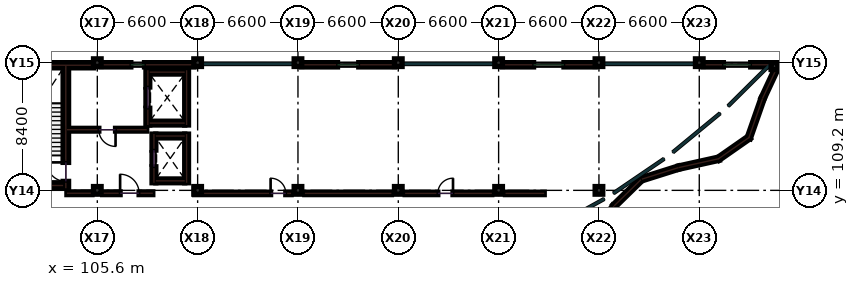
"""IFC4 building model, lengths in metres.
Left out: names, types, materials, properties, quantities, classifications, styles, units other than length and angle.
Written with IfcOpenShell. Run it as: python <this file> out.ifc"""

import sys

from ifc_helpers import new_model, si_unit, direction, frame, frame_2d, origin, origin_2d, place, context, subcontext, project, spatial, rectangle, extrude, element, fill, save


model = new_model("IFC4")
c1 = context("Model", 3, precision=1e-05, world=origin(), true_north=direction((0.0, 1.0)))
c2 = subcontext(c1, "Body", "Model", "MODEL_VIEW")
j1 = project(units=[si_unit("LENGTHUNIT", "METRE"), si_unit("PLANEANGLEUNIT", "RADIAN")], contexts=[c1])
p1 = place(None, origin())
s1 = spatial("IfcSite", under=j1, at=p1, CompositionType="ELEMENT")
p2 = place(p1, origin())
s2 = spatial("IfcBuilding", under=s1, at=p2, CompositionType="ELEMENT")
p3 = place(p2, frame((0.0, 0.0, 18.6)))
s3 = spatial("IfcBuildingStorey", under=s2, at=p3, CompositionType="ELEMENT", Elevation=18.6)
for number, where, z_axis, x_axis in (
    (1, (105.6, 109.2, 0.0), (0.0, 0.0, 1.0), (1.0, 0.0, 0.0)),
    (2, (105.6, 117.6, 0.0), (0.0, 0.0, 1.0), (1.0, 0.0, 0.0)),
    (3, (112.2, 109.2, 0.0), (0.0, 0.0, 1.0), (1.0, 0.0, 0.0)),
    (4, (112.2, 117.6, 0.0), (0.0, 0.0, 1.0), (1.0, 0.0, 0.0)),
    (5, (118.8, 109.2, 0.0), (0.0, 0.0, 1.0), (1.0, 0.0, 0.0)),
    (6, (118.8, 117.6, 0.0), (0.0, 0.0, 1.0), (1.0, 0.0, 0.0)),
    (7, (125.4, 109.2, 0.0), (0.0, 0.0, 1.0), (1.0, 0.0, 0.0)),
    (8, (125.4, 117.6, 0.0), (0.0, 0.0, 1.0), (1.0, 0.0, 0.0)),
    (9, (132.0, 109.2, 0.0), (0.0, 0.0, 1.0), (1.0, 0.0, 0.0)),
    (10, (132.0, 117.6, 0.0), (0.0, 0.0, 1.0), (1.0, 0.0, 0.0)),
    (11, (138.6, 109.2, 0.0), (0.0, 0.0, 1.0), (1.0, 0.0, 0.0)),
    (12, (138.6, 117.6, 0.0), (0.0, 0.0, 1.0), (1.0, 0.0, 0.0)),
    (13, (145.2, 117.6, 0.0), (0.0, 0.0, 1.0), (1.0, 0.0, 0.0)),
):
    element("IfcColumn", number, at=place(p3, frame(where, z_axis=z_axis, x_axis=x_axis)), inside=s3, PredefinedType="COLUMN", context=c2, shape_type="SweptSolid", body=[
        extrude(rectangle(XDim=0.5, YDim=0.5, at=origin_2d()), origin(), (0.0, 0.0, 1.0), 4.2),
    ])
p4 = place(p3, frame((150.15, 117.375, 0.0), z_axis=(0.0, 0.0, 1.0), x_axis=(1.0, 0.0, 0.0)))
e14 = element("IfcColumn", 14, at=p4, inside=s3, PredefinedType="COLUMN", context=c2, shape_type="SweptSolid", body=[
    extrude(rectangle(XDim=0.45, YDim=0.45, at=origin_2d()), origin(), (0.0, 0.0, 1.0), 4.2),
])
p5 = place(p3, frame((112.0, 109.0, 0.0), z_axis=(0.0, 0.0, 1.0), x_axis=(1.0, 0.0, 0.0)))
e15 = element("IfcWall", 15, at=p5, inside=s3, PredefinedType="PARTITIONING", context=c2, shape_type="SweptSolid", body=[
    extrude(rectangle(XDim=6.35, YDim=0.16, at=frame_2d((3.175, 0.0))), origin(), (0.0, 0.0, 1.0), 3.175),
])
p6 = place(p5, frame((5.0, 0.0, 0.0)))
e16 = element("IfcOpeningElement", 16, at=p6, cuts=e15, PredefinedType="OPENING", context=c2, shape_type="SweptSolid", body=[
    extrude(rectangle(XDim=1.0, YDim=2.2, at=frame_2d((0.5, 1.1))), frame((0.0, 0.09, 0.0), z_axis=(0.0, -1.0, 0.0), x_axis=(1.0, 0.0, 0.0)), (0.0, 0.0, 1.0), 0.18),
])
p7 = place(p3, frame((119.25, 109.0, 0.0), z_axis=(0.0, 0.0, 1.0), x_axis=(1.0, 0.0, 0.0)))
e17 = element("IfcWall", 17, at=p7, inside=s3, PredefinedType="PARTITIONING", context=c2, shape_type="SweptSolid", body=[
    extrude(rectangle(XDim=5.7, YDim=0.16, at=frame_2d((2.85, 0.0))), origin(), (0.0, 0.0, 1.0), 3.175),
])
p8 = place(p3, frame((125.85, 109.0, 0.0), z_axis=(0.0, 0.0, 1.0), x_axis=(1.0, 0.0, 0.0)))
e18 = element("IfcWall", 18, at=p8, inside=s3, PredefinedType="PARTITIONING", context=c2, shape_type="SweptSolid", body=[
    extrude(rectangle(XDim=5.7, YDim=0.16, at=frame_2d((2.85, 0.0))), origin(), (0.0, 0.0, 1.0), 3.175),
])
p9 = place(p8, frame((2.15, 0.0, 0.0)))
e19 = element("IfcOpeningElement", 19, at=p9, cuts=e18, PredefinedType="OPENING", context=c2, shape_type="SweptSolid", body=[
    extrude(rectangle(XDim=1.0, YDim=2.2, at=frame_2d((0.5, 1.1))), frame((0.0, 0.09, 0.0), z_axis=(0.0, -1.0, 0.0), x_axis=(1.0, 0.0, 0.0)), (0.0, 0.0, 1.0), 0.18),
])
p10 = place(p3, frame((132.45, 109.0, 0.0), z_axis=(0.0, 0.0, 1.0), x_axis=(1.0, 0.0, 0.0)))
e20 = element("IfcWall", 20, at=p10, inside=s3, PredefinedType="PARTITIONING", context=c2, shape_type="SweptSolid", body=[
    extrude(rectangle(XDim=2.55, YDim=0.16, at=frame_2d((1.275, 0.0))), origin(), (0.0, 0.0, 1.0), 3.175),
])
p11 = place(p3, frame((105.355, 117.43, 0.0), z_axis=(0.0, 0.0, 1.0), x_axis=(-1.0, 0.0, 0.0)))
e21 = element("IfcWall", 21, at=p11, inside=s3, PredefinedType="SHEAR", context=c2, shape_type="SweptSolid", body=[
    extrude(rectangle(XDim=6.11, YDim=0.34, at=frame_2d((3.055, 0.0))), origin(), (0.0, 0.0, 1.0), 3.94),
])
p12 = place(p3, frame((111.955, 117.46, 0.0), z_axis=(0.0, 0.0, 1.0), x_axis=(-1.0, 0.0, 0.0)))
e22 = element("IfcWall", 22, at=p12, inside=s3, PredefinedType="SOLIDWALL", context=c2, shape_type="SweptSolid", body=[
    extrude(rectangle(XDim=6.11, YDim=0.28, at=frame_2d((3.055, 0.0))), origin(), (0.0, 0.0, 1.0), 3.325),
])
p13 = place(p12, frame((3.25, 0.0, 0.95)))
e23 = element("IfcOpeningElement", 23, at=p13, cuts=e22, PredefinedType="OPENING", context=c2, shape_type="SweptSolid", body=[
    extrude(rectangle(XDim=0.9, YDim=1.4, at=frame_2d((0.45, 0.7))), frame((0.0, 0.15, 0.0), z_axis=(0.0, -1.0, 0.0), x_axis=(1.0, 0.0, 0.0)), (0.0, 0.0, 1.0), 0.3),
])
p14 = place(p3, frame((125.155, 117.46, 0.0), z_axis=(0.0, 0.0, 1.0), x_axis=(-1.0, 0.0, 0.0)))
e24 = element("IfcWall", 24, at=p14, inside=s3, PredefinedType="SOLIDWALL", context=c2, shape_type="SweptSolid", body=[
    extrude(rectangle(XDim=6.11, YDim=0.28, at=frame_2d((3.055, 0.0))), origin(), (0.0, 0.0, 1.0), 3.325),
])
p15 = place(p14, frame((2.355, 0.0, 0.95)))
e25 = element("IfcOpeningElement", 25, at=p15, cuts=e24, PredefinedType="OPENING", context=c2, shape_type="SweptSolid", body=[
    extrude(rectangle(XDim=1.4, YDim=1.95, at=frame_2d((0.7, 0.975))), frame((0.0, 0.15, 0.0), z_axis=(0.0, -1.0, 0.0), x_axis=(1.0, 0.0, 0.0)), (0.0, 0.0, 1.0), 0.3),
])
p16 = place(p3, frame((138.355, 117.46, 0.0), z_axis=(0.0, 0.0, 1.0), x_axis=(-1.0, 0.0, 0.0)))
e26 = element("IfcWall", 26, at=p16, inside=s3, PredefinedType="SOLIDWALL", context=c2, shape_type="SweptSolid", body=[
    extrude(rectangle(XDim=6.11, YDim=0.28, at=frame_2d((3.055, 0.0))), origin(), (0.0, 0.0, 1.0), 3.325),
])
p17 = place(p16, frame((2.055, 0.0, 0.95)))
e27 = element("IfcOpeningElement", 27, at=p17, cuts=e26, PredefinedType="OPENING", context=c2, shape_type="SweptSolid", body=[
    extrude(rectangle(XDim=2.0, YDim=1.95, at=frame_2d((1.0, 0.975))), frame((0.0, 0.15, 0.0), z_axis=(0.0, -1.0, 0.0), x_axis=(1.0, 0.0, 0.0)), (0.0, 0.0, 1.0), 0.3),
])
p18 = place(p3, frame((138.095, 105.88, 0.0), z_axis=(0.0, 0.0, 1.0), x_axis=(0.548361068299, 0.836241674861, 0.0)))
e28 = element("IfcWall", 28, at=p18, inside=s3, PredefinedType="SOLIDWALL", context=c2, shape_type="SweptSolid", body=[
    extrude(rectangle(XDim=2.727, YDim=0.22, at=frame_2d((1.363, 0.0))), origin(), (0.0, 0.0, 1.0), 1.45),
])
p19 = place(p3, frame((139.605, 108.185, 0.0), z_axis=(0.0, 0.0, 1.0), x_axis=(0.715267450617, 0.698850823916, 0.0)))
e29 = element("IfcWall", 29, at=p19, inside=s3, PredefinedType="SOLIDWALL", context=c2, shape_type="SweptSolid", body=[
    extrude(rectangle(XDim=2.454, YDim=0.22, at=frame_2d((1.227, 0.0))), origin(), (0.0, 0.0, 1.0), 1.45),
])
p20 = place(p3, frame((141.42, 109.935, 0.0), z_axis=(0.0, 0.0, 1.0), x_axis=(0.953706689172, 0.300738343131, 0.0)))
e30 = element("IfcWall", 30, at=p20, inside=s3, PredefinedType="SOLIDWALL", context=c2, shape_type="SweptSolid", body=[
    extrude(rectangle(XDim=2.527, YDim=0.22, at=frame_2d((1.264, 0.0))), origin(), (0.0, 0.0, 1.0), 1.45),
])
p21 = place(p3, frame((143.84, 110.695, 0.0), z_axis=(0.0, 0.0, 1.0), x_axis=(0.976283950576, 0.216493990325, 0.0)))
e31 = element("IfcWall", 31, at=p21, inside=s3, PredefinedType="SOLIDWALL", context=c2, shape_type="SweptSolid", body=[
    extrude(rectangle(XDim=2.725, YDim=0.22, at=frame_2d((1.362, 0.0))), origin(), (0.0, 0.0, 1.0), 1.45),
])
p22 = place(p3, frame((146.45, 111.265, 0.0), z_axis=(0.0, 0.0, 1.0), x_axis=(0.82014400818, 0.572157151354, 0.0)))
e32 = element("IfcWall", 32, at=p22, inside=s3, PredefinedType="SOLIDWALL", context=c2, shape_type="SweptSolid", body=[
    extrude(rectangle(XDim=2.5, YDim=0.22, at=frame_2d((1.25, 0.0))), origin(), (0.0, 0.0, 1.0), 1.45),
])
p23 = place(p3, frame((148.45, 112.625, 0.0), z_axis=(0.0, 0.0, 1.0), x_axis=(0.330283694056, 0.943881709453, 0.0)))
e33 = element("IfcWall", 33, at=p23, inside=s3, PredefinedType="SOLIDWALL", context=c2, shape_type="SweptSolid", body=[
    extrude(rectangle(XDim=2.771, YDim=0.22, at=frame_2d((1.385, 0.0))), origin(), (0.0, 0.0, 1.0), 1.45),
])
p24 = place(p3, frame((149.365, 115.25, 0.0), z_axis=(0.0, 0.0, 1.0), x_axis=(0.422862396533, 0.906193905077, 0.0)))
e34 = element("IfcWall", 34, at=p24, inside=s3, PredefinedType="SOLIDWALL", context=c2, shape_type="SweptSolid", body=[
    extrude(rectangle(XDim=2.317, YDim=0.22, at=frame_2d((1.159, 0.0))), origin(), (0.0, 0.0, 1.0), 1.45),
])
p25 = place(p3, frame((149.93, 117.46, 0.0), z_axis=(0.0, 0.0, 1.0), x_axis=(-1.0, 0.0, 0.0)))
e35 = element("IfcWall", 35, at=p25, inside=s3, PredefinedType="SOLIDWALL", context=c2, shape_type="SweptSolid", body=[
    extrude(rectangle(XDim=4.485, YDim=0.28, at=frame_2d((2.242, 0.0))), origin(), (0.0, 0.0, 1.0), 3.325),
])
p26 = place(p25, frame((1.345, 0.0, 0.95)))
e36 = element("IfcOpeningElement", 36, at=p26, cuts=e35, PredefinedType="OPENING", context=c2, shape_type="SweptSolid", body=[
    extrude(rectangle(XDim=1.8, YDim=1.6, at=frame_2d((0.9, 0.8))), frame((0.0, 0.15, 0.0), z_axis=(0.0, -1.0, 0.0), x_axis=(1.0, 0.0, 0.0)), (0.0, 0.0, 1.0), 0.3),
])
p27 = place(p3, frame((103.53, 109.34, 0.0), z_axis=(0.0, 0.0, 1.0), x_axis=(0.0, 1.0, 0.0)))
e37 = element("IfcWall", 37, at=p27, inside=s3, PredefinedType="SHEAR", context=c2, shape_type="SweptSolid", body=[
    extrude(rectangle(XDim=8.09, YDim=0.36, at=frame_2d((4.045, 0.0))), origin(), (0.0, 0.0, 1.0), 3.94),
])
p28 = place(p27, frame((0.45, 0.0, 0.0)))
e38 = element("IfcOpeningElement", 38, at=p28, cuts=e37, PredefinedType="OPENING", context=c2, shape_type="SweptSolid", body=[
    extrude(rectangle(XDim=1.25, YDim=2.15, at=frame_2d((0.625, 1.075))), frame((0.0, 0.19, 0.0), z_axis=(0.0, -1.0, 0.0), x_axis=(1.0, 0.0, 0.0)), (0.0, 0.0, 1.0), 0.38),
])
p29 = place(p3, frame((99.55, 109.52, 0.0), z_axis=(0.0, 0.0, 1.0), x_axis=(1.0, 0.0, 0.0)))
e39 = element("IfcWall", 39, at=p29, inside=s3, PredefinedType="SHEAR", context=c2, shape_type="SweptSolid", body=[
    extrude(rectangle(XDim=3.8, YDim=0.36, at=frame_2d((1.9, 0.0))), origin(), (0.0, 0.0, 1.0), 3.94),
])
p30 = place(p3, frame((109.325, 109.7, 0.0), z_axis=(0.0, 0.0, 1.0), x_axis=(0.0, 1.0, 0.0)))
e40 = element("IfcWall", 40, at=p30, inside=s3, PredefinedType="SHEAR", context=c2, shape_type="SweptSolid", body=[
    extrude(rectangle(XDim=3.2, YDim=0.25, at=frame_2d((1.6, 0.0))), origin(), (0.0, 0.0, 1.0), 3.94),
])
p31 = place(p30, frame((1.05, 0.0, 0.0)))
e41 = element("IfcOpeningElement", 41, at=p31, cuts=e40, PredefinedType="OPENING", context=c2, shape_type="SweptSolid", body=[
    extrude(rectangle(XDim=1.1, YDim=2.15, at=frame_2d((0.55, 1.075))), frame((0.0, 0.135, 0.0), z_axis=(0.0, -1.0, 0.0), x_axis=(1.0, 0.0, 0.0)), (0.0, 0.0, 1.0), 0.27),
])
p32 = place(p3, frame((111.475, 109.7, 0.0), z_axis=(0.0, 0.0, 1.0), x_axis=(0.0, 1.0, 0.0)))
e42 = element("IfcWall", 42, at=p32, inside=s3, PredefinedType="SHEAR", context=c2, shape_type="SweptSolid", body=[
    extrude(rectangle(XDim=3.2, YDim=0.25, at=frame_2d((1.6, 0.0))), origin(), (0.0, 0.0, 1.0), 3.94),
])
for number, where, z_axis, x_axis in (
    (43, (109.45, 109.825, 0.0), (0.0, 0.0, 1.0), (1.0, 0.0, 0.0)),
    (44, (109.45, 112.775, 0.0), (0.0, 0.0, 1.0), (1.0, 0.0, 0.0)),
):
    element("IfcWall", number, at=place(p3, frame(where, z_axis=z_axis, x_axis=x_axis)), inside=s3, PredefinedType="SHEAR", context=c2, shape_type="SweptSolid", body=[
        extrude(rectangle(XDim=1.9, YDim=0.25, at=frame_2d((0.95, 0.0))), origin(), (0.0, 0.0, 1.0), 3.94),
    ])
p33 = place(p3, frame((108.925, 113.5, 0.0), z_axis=(0.0, 0.0, 1.0), x_axis=(0.0, 1.0, 0.0)))
e45 = element("IfcWall", 45, at=p33, inside=s3, PredefinedType="SHEAR", context=c2, shape_type="SweptSolid", body=[
    extrude(rectangle(XDim=3.6, YDim=0.25, at=frame_2d((1.8, 0.0))), origin(), (0.0, 0.0, 1.0), 3.94),
])
p34 = place(p33, frame((1.1, 0.0, 0.0)))
e46 = element("IfcOpeningElement", 46, at=p34, cuts=e45, PredefinedType="OPENING", context=c2, shape_type="SweptSolid", body=[
    extrude(rectangle(XDim=1.4, YDim=2.2, at=frame_2d((0.7, 1.1))), frame((0.0, 0.135, 0.0), z_axis=(0.0, -1.0, 0.0), x_axis=(1.0, 0.0, 0.0)), (0.0, 0.0, 1.0), 0.27),
])
p35 = place(p3, frame((111.475, 113.5, 0.0), z_axis=(0.0, 0.0, 1.0), x_axis=(0.0, 1.0, 0.0)))
e47 = element("IfcWall", 47, at=p35, inside=s3, PredefinedType="SHEAR", context=c2, shape_type="SweptSolid", body=[
    extrude(rectangle(XDim=3.6, YDim=0.25, at=frame_2d((1.8, 0.0))), origin(), (0.0, 0.0, 1.0), 3.94),
])
for number, where, z_axis, x_axis in (
    (48, (109.05, 113.625, 0.0), (0.0, 0.0, 1.0), (1.0, 0.0, 0.0)),
    (49, (109.05, 116.975, 0.0), (0.0, 0.0, 1.0), (1.0, 0.0, 0.0)),
):
    element("IfcWall", number, at=place(p3, frame(where, z_axis=z_axis, x_axis=x_axis)), inside=s3, PredefinedType="SHEAR", context=c2, shape_type="SweptSolid", body=[
        extrude(rectangle(XDim=2.3, YDim=0.25, at=frame_2d((1.15, 0.0))), origin(), (0.0, 0.0, 1.0), 3.94),
    ])
p36 = place(p3, frame((103.6, 109.01, 0.0), z_axis=(0.0, 0.0, 1.0), x_axis=(1.0, 0.0, 0.0)))
e50 = element("IfcWall", 50, at=p36, inside=s3, PredefinedType="SOLIDWALL", context=c2, shape_type="SweptSolid", body=[
    extrude(rectangle(XDim=1.65, YDim=0.18, at=frame_2d((0.825, 0.0))), origin(), (0.0, 0.0, 1.0), 3.175),
])
p37 = place(p3, frame((105.95, 109.01, 0.0), z_axis=(0.0, 0.0, 1.0), x_axis=(1.0, 0.0, 0.0)))
e51 = element("IfcWall", 51, at=p37, inside=s3, PredefinedType="SOLIDWALL", context=c2, shape_type="SweptSolid", body=[
    extrude(rectangle(XDim=3.3, YDim=0.18, at=frame_2d((1.65, 0.0))), origin(), (0.0, 0.0, 1.0), 3.175),
])
p38 = place(p37, frame((1.15, 0.0, 0.0)))
e52 = element("IfcOpeningElement", 52, at=p38, cuts=e51, PredefinedType="OPENING", context=c2, shape_type="SweptSolid", body=[
    extrude(rectangle(XDim=1.25, YDim=2.15, at=frame_2d((0.625, 1.075))), frame((0.0, 0.1, 0.0), z_axis=(0.0, -1.0, 0.0), x_axis=(1.0, 0.0, 0.0)), (0.0, 0.0, 1.0), 0.2),
])
p39 = place(p3, frame((103.6, 113.19, 0.0), z_axis=(0.0, 0.0, 1.0), x_axis=(1.0, 0.0, 0.0)))
e53 = element("IfcWall", 53, at=p39, inside=s3, PredefinedType="SOLIDWALL", context=c2, shape_type="SweptSolid", body=[
    extrude(rectangle(XDim=5.25, YDim=0.18, at=frame_2d((2.625, 0.0))), origin(), (0.0, 0.0, 1.0), 3.94),
])
p40 = place(p39, frame((2.1, 0.0, 0.0)))
e54 = element("IfcOpeningElement", 54, at=p40, cuts=e53, PredefinedType="OPENING", context=c2, shape_type="SweptSolid", body=[
    extrude(rectangle(XDim=1.1, YDim=2.15, at=frame_2d((0.55, 1.075))), frame((0.0, 0.1, 0.0), z_axis=(0.0, -1.0, 0.0), x_axis=(1.0, 0.0, 0.0)), (0.0, 0.0, 1.0), 0.2),
])
p41 = place(p6, origin())
e55 = element("IfcDoor", 55, at=p41, inside=s3, OperationType="SINGLE_SWING_LEFT", PredefinedType="DOOR", context=c2, shape_type="SweptSolid", body=[
    extrude(rectangle(XDim=1.0, YDim=2.2, at=frame_2d((0.5, 1.1))), frame((0.0, 0.025, 0.0), z_axis=(0.0, -1.0, 0.0), x_axis=(1.0, 0.0, 0.0)), (0.0, 0.0, 1.0), 0.05),
])
fill(e16, e55)
p42 = place(p9, origin())
e56 = element("IfcDoor", 56, at=p42, inside=s3, OperationType="SINGLE_SWING_RIGHT", PredefinedType="DOOR", context=c2, shape_type="SweptSolid", body=[
    extrude(rectangle(XDim=1.0, YDim=2.2, at=frame_2d((0.5, 1.1))), frame((0.0, 0.025, 0.0), z_axis=(0.0, -1.0, 0.0), x_axis=(1.0, 0.0, 0.0)), (0.0, 0.0, 1.0), 0.05),
])
fill(e19, e56)
p43 = place(p13, origin())
e57 = element("IfcWindow", 57, at=p43, inside=s3, PartitioningType="SINGLE_PANEL", PredefinedType="WINDOW", context=c2, shape_type="SweptSolid", body=[
    extrude(rectangle(XDim=0.9, YDim=1.4, at=frame_2d((0.45, 0.7))), frame((0.0, 0.03, 0.0), z_axis=(0.0, -1.0, 0.0), x_axis=(1.0, 0.0, 0.0)), (0.0, 0.0, 1.0), 0.06),
])
fill(e23, e57)
p44 = place(p15, origin())
e58 = element("IfcWindow", 58, at=p44, inside=s3, PartitioningType="SINGLE_PANEL", PredefinedType="WINDOW", context=c2, shape_type="SweptSolid", body=[
    extrude(rectangle(XDim=1.4, YDim=1.95, at=frame_2d((0.7, 0.975))), frame((0.0, 0.03, 0.0), z_axis=(0.0, -1.0, 0.0), x_axis=(1.0, 0.0, 0.0)), (0.0, 0.0, 1.0), 0.06),
])
fill(e25, e58)
p45 = place(p17, origin())
e59 = element("IfcWindow", 59, at=p45, inside=s3, PartitioningType="SINGLE_PANEL", PredefinedType="WINDOW", context=c2, shape_type="SweptSolid", body=[
    extrude(rectangle(XDim=2.0, YDim=1.95, at=frame_2d((1.0, 0.975))), frame((0.0, 0.03, 0.0), z_axis=(0.0, -1.0, 0.0), x_axis=(1.0, 0.0, 0.0)), (0.0, 0.0, 1.0), 0.06),
])
fill(e27, e59)
p46 = place(p26, origin())
e60 = element("IfcWindow", 60, at=p46, inside=s3, PartitioningType="SINGLE_PANEL", PredefinedType="WINDOW", context=c2, shape_type="SweptSolid", body=[
    extrude(rectangle(XDim=1.8, YDim=1.6, at=frame_2d((0.9, 0.8))), frame((0.0, 0.03, 0.0), z_axis=(0.0, -1.0, 0.0), x_axis=(1.0, 0.0, 0.0)), (0.0, 0.0, 1.0), 0.06),
])
fill(e36, e60)
p47 = place(p28, origin())
e61 = element("IfcDoor", 61, at=p47, inside=s3, OperationType="SINGLE_SWING_RIGHT", PredefinedType="DOOR", context=c2, shape_type="SweptSolid", body=[
    extrude(rectangle(XDim=1.25, YDim=2.15, at=frame_2d((0.625, 1.075))), frame((0.0, 0.025, 0.0), z_axis=(0.0, -1.0, 0.0), x_axis=(1.0, 0.0, 0.0)), (0.0, 0.0, 1.0), 0.05),
])
fill(e38, e61)
p48 = place(p31, origin())
e62 = element("IfcDoor", 62, at=p48, inside=s3, OperationType="SLIDING_TO_LEFT", PredefinedType="DOOR", context=c2, shape_type="SweptSolid", body=[
    extrude(rectangle(XDim=1.1, YDim=2.15, at=frame_2d((0.55, 1.075))), frame((0.0, 0.025, 0.0), z_axis=(0.0, -1.0, 0.0), x_axis=(1.0, 0.0, 0.0)), (0.0, 0.0, 1.0), 0.05),
])
fill(e41, e62)
p49 = place(p34, origin())
e63 = element("IfcDoor", 63, at=p49, inside=s3, OperationType="SLIDING_TO_LEFT", PredefinedType="DOOR", context=c2, shape_type="SweptSolid", body=[
    extrude(rectangle(XDim=1.4, YDim=2.2, at=frame_2d((0.7, 1.1))), frame((0.0, 0.025, 0.0), z_axis=(0.0, -1.0, 0.0), x_axis=(1.0, 0.0, 0.0)), (0.0, 0.0, 1.0), 0.05),
])
fill(e46, e63)
p50 = place(p38, origin())
e64 = element("IfcDoor", 64, at=p50, inside=s3, OperationType="SINGLE_SWING_LEFT", PredefinedType="DOOR", context=c2, shape_type="SweptSolid", body=[
    extrude(rectangle(XDim=1.25, YDim=2.15, at=frame_2d((0.625, 1.075))), frame((0.0, 0.025, 0.0), z_axis=(0.0, -1.0, 0.0), x_axis=(1.0, 0.0, 0.0)), (0.0, 0.0, 1.0), 0.05),
])
fill(e52, e64)
p51 = place(p40, frame((1.1, 0.0, 0.0), z_axis=(0.0, 0.0, 1.0), x_axis=(-1.0, 0.0, 0.0)))
e65 = element("IfcDoor", 65, at=p51, inside=s3, OperationType="SINGLE_SWING_RIGHT", PredefinedType="DOOR", context=c2, shape_type="SweptSolid", body=[
    extrude(rectangle(XDim=1.1, YDim=2.15, at=frame_2d((0.55, 1.075))), frame((0.0, 0.025, 0.0), z_axis=(0.0, -1.0, 0.0), x_axis=(1.0, 0.0, 0.0)), (0.0, 0.0, 1.0), 0.05),
])
fill(e54, e65)
save(model, sys.argv[1])
